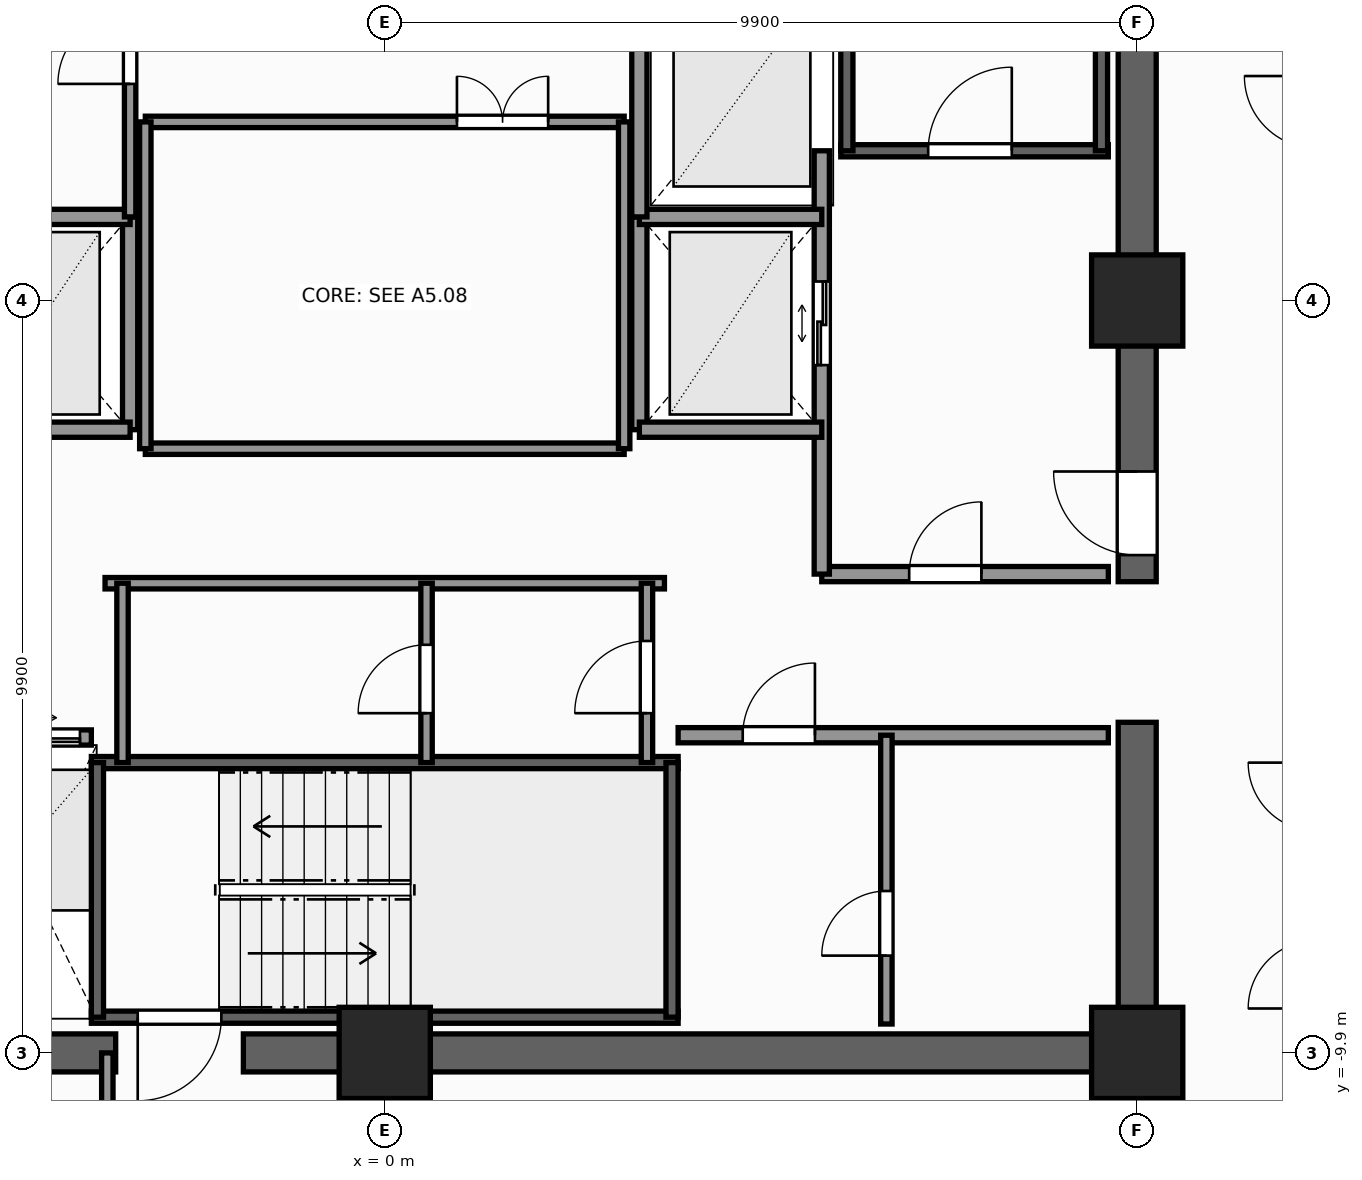
"""IFC4 building model, lengths in metres.
Left out: names, types, materials, properties, quantities, classifications, styles, units other than length and angle.
Written with IfcOpenShell. Run it as: python <this file> out.ifc"""

import sys

from ifc_helpers import new_model, si_unit, direction, frame, frame_2d, origin, origin_2d, place, context, subcontext, project, spatial, rectangle, extrude, element, fill, save


model = new_model("IFC4")
c1 = context("Model", 3, precision=1e-05, world=origin(), true_north=direction((0.0, 1.0)))
c2 = subcontext(c1, "Body", "Model", "MODEL_VIEW")
j1 = project(units=[si_unit("LENGTHUNIT", "METRE"), si_unit("PLANEANGLEUNIT", "RADIAN")], contexts=[c1])
p1 = place(None, origin())
s1 = spatial("IfcSite", under=j1, at=p1, CompositionType="ELEMENT")
p2 = place(p1, origin())
s2 = spatial("IfcBuilding", under=s1, at=p2, CompositionType="ELEMENT")
p3 = place(p2, frame((0.0, 0.0, 108.5)))
s3 = spatial("IfcBuildingStorey", under=s2, at=p3, CompositionType="ELEMENT", Elevation=108.5)
p4 = place(p3, frame((10.15, -9.9, 0.0), z_axis=(0.0, 0.0, 1.0), x_axis=(-1.0, 0.0, 0.0)))
e1 = element("IfcWall", 1, at=p4, inside=s3, PredefinedType="SHEAR", context=c2, shape_type="SweptSolid", body=[
    extrude(rectangle(XDim=12.01, YDim=0.5, at=frame_2d((6.005, 0.0))), origin(), (0.0, 0.0, 1.0), 3.3),
])
p5 = place(p3, frame((-3.54, -9.9, 0.0), z_axis=(0.0, 0.0, 1.0), x_axis=(-1.0, 0.0, 0.0)))
e2 = element("IfcWall", 2, at=p5, inside=s3, PredefinedType="SHEAR", context=c2, shape_type="SweptSolid", body=[
    extrude(rectangle(XDim=6.61, YDim=0.5, at=frame_2d((3.305, 0.0))), origin(), (0.0, 0.0, 1.0), 3.3),
])
p6 = place(p3, frame((9.9, -9.65, 0.0), z_axis=(0.0, 0.0, 1.0), x_axis=(0.0, 1.0, 0.0)))
e3 = element("IfcWall", 3, at=p6, inside=s3, PredefinedType="SHEAR", context=c2, shape_type="SweptSolid", body=[
    extrude(rectangle(XDim=4.1, YDim=0.5, at=frame_2d((2.05, 0.0))), origin(), (0.0, 0.0, 1.0), 3.3),
])
p7 = place(p3, frame((9.9, -3.7, 0.0), z_axis=(0.0, 0.0, 1.0), x_axis=(0.0, 1.0, 0.0)))
e4 = element("IfcWall", 4, at=p7, inside=s3, PredefinedType="SHEAR", context=c2, shape_type="SweptSolid", body=[
    extrude(rectangle(XDim=13.35, YDim=0.5, at=frame_2d((6.675, 0.0))), origin(), (0.0, 0.0, 1.0), 3.3),
])
p8 = place(p7, frame((0.35, 0.0, 0.0)))
e5 = element("IfcOpeningElement", 5, at=p8, cuts=e4, PredefinedType="OPENING", context=c2, shape_type="SweptSolid", body=[
    extrude(rectangle(XDim=1.1, YDim=2.2, at=frame_2d((0.55, 1.1))), frame((0.0, 0.26, 0.0), z_axis=(0.0, -1.0, 0.0), x_axis=(1.0, 0.0, 0.0)), (0.0, 0.0, 1.0), 0.52),
])
for number, where, z_axis, x_axis in (
    (6, (9.9, -9.9, 0.0), (0.0, 0.0, 1.0), (1.0, 0.0, 0.0)),
    (7, (0.0, -9.9, 0.0), (0.0, 0.0, 1.0), (1.0, 0.0, 0.0)),
    (8, (9.9, 0.0, 0.0), (0.0, 0.0, 1.0), (1.0, 0.0, 0.0)),
):
    element("IfcColumn", number, at=place(p3, frame(where, z_axis=z_axis, x_axis=x_axis)), inside=s3, PredefinedType="COLUMN", context=c2, shape_type="SweptSolid", body=[
        extrude(rectangle(XDim=1.2, YDim=1.2, at=origin_2d()), origin(), (0.0, 0.0, 1.0), 3.3),
    ])
p9 = place(p3, frame((6.0, 1.97, 0.0), z_axis=(0.0, 0.0, 1.0), x_axis=(1.0, 0.0, 0.0)))
e9 = element("IfcWall", 9, at=p9, inside=s3, PredefinedType="SHEAR", context=c2, shape_type="SweptSolid", body=[
    extrude(rectangle(XDim=3.52, YDim=0.16, at=frame_2d((1.76, 0.0))), origin(), (0.0, 0.0, 1.0), 3.3),
])
p10 = place(p9, frame((1.15, 0.0, 0.0)))
e10 = element("IfcOpeningElement", 10, at=p10, cuts=e9, PredefinedType="OPENING", context=c2, shape_type="SweptSolid", body=[
    extrude(rectangle(XDim=1.1, YDim=2.2, at=frame_2d((0.55, 1.1))), frame((0.0, 0.09, 0.0), z_axis=(0.0, -1.0, 0.0), x_axis=(1.0, 0.0, 0.0)), (0.0, 0.0, 1.0), 0.18),
])
for number, where, z_axis, x_axis in (
    (11, (6.08, 1.97, 0.0), (0.0, 0.0, 1.0), (0.0, 1.0, 0.0)),
    (12, (9.43, 1.97, 0.0), (0.0, 0.0, 1.0), (0.0, 1.0, 0.0)),
):
    element("IfcWall", number, at=place(p3, frame(where, z_axis=z_axis, x_axis=x_axis)), inside=s3, PredefinedType="SHEAR", context=c2, shape_type="SweptSolid", body=[
        extrude(rectangle(XDim=7.56, YDim=0.16, at=frame_2d((3.78, 0.0))), origin(), (0.0, 0.0, 1.0), 3.3),
    ])
p11 = place(p3, frame((3.86, -9.43, 0.0), z_axis=(0.0, 0.0, 1.0), x_axis=(-1.0, 0.0, 0.0)))
e13 = element("IfcWall", 13, at=p11, inside=s3, PredefinedType="SHEAR", context=c2, shape_type="SweptSolid", body=[
    extrude(rectangle(XDim=7.72, YDim=0.16, at=frame_2d((3.86, 0.0))), origin(), (0.0, 0.0, 1.0), 3.3),
])
p12 = place(p11, frame((6.01, 0.0, 0.0)))
e14 = element("IfcOpeningElement", 14, at=p12, cuts=e13, PredefinedType="OPENING", context=c2, shape_type="SweptSolid", body=[
    extrude(rectangle(XDim=1.1, YDim=2.2, at=frame_2d((0.55, 1.1))), frame((0.0, 0.09, 0.0), z_axis=(0.0, -1.0, 0.0), x_axis=(1.0, 0.0, 0.0)), (0.0, 0.0, 1.0), 0.18),
])
p13 = place(p3, frame((-3.86, -6.08, 0.0), z_axis=(0.0, 0.0, 1.0), x_axis=(1.0, 0.0, 0.0)))
e15 = element("IfcWall", 15, at=p13, inside=s3, PredefinedType="SHEAR", context=c2, shape_type="SweptSolid", body=[
    extrude(rectangle(XDim=7.72, YDim=0.16, at=frame_2d((3.86, 0.0))), origin(), (0.0, 0.0, 1.0), 3.3),
])
for number, where, z_axis, x_axis in (
    (16, (-3.78, -9.43, 0.0), (0.0, 0.0, 1.0), (0.0, 1.0, 0.0)),
    (17, (3.78, -9.43, 0.0), (0.0, 0.0, 1.0), (0.0, 1.0, 0.0)),
):
    element("IfcWall", number, at=place(p3, frame(where, z_axis=z_axis, x_axis=x_axis)), inside=s3, PredefinedType="SHEAR", context=c2, shape_type="SweptSolid", body=[
        extrude(rectangle(XDim=3.35, YDim=0.16, at=frame_2d((1.675, 0.0))), origin(), (0.0, 0.0, 1.0), 3.3),
    ])
p14 = place(p3, frame((-3.35, -1.7, 0.0), z_axis=(0.0, 0.0, 1.0), x_axis=(0.0, 1.0, 0.0)))
e18 = element("IfcWall", 18, at=p14, inside=s3, PredefinedType="SOLIDWALL", context=c2, shape_type="SweptSolid", body=[
    extrude(rectangle(XDim=2.8, YDim=0.2, at=frame_2d((1.4, 0.0))), origin(), (0.0, 0.0, 1.0), 2.715),
])
for number, where, z_axis, x_axis in (
    (19, (-5.75, -1.7, 0.0), (0.0, 0.0, 1.0), (1.0, 0.0, 0.0)),
    (20, (-5.75, 1.1, 0.0), (0.0, 0.0, 1.0), (1.0, 0.0, 0.0)),
):
    element("IfcWall", number, at=place(p3, frame(where, z_axis=z_axis, x_axis=x_axis)), inside=s3, PredefinedType="SOLIDWALL", context=c2, shape_type="SweptSolid", body=[
        extrude(rectangle(XDim=2.4, YDim=0.2, at=frame_2d((1.2, 0.0))), origin(), (0.0, 0.0, 1.0), 3.08),
    ])
p15 = place(p3, frame((5.75, -3.6, 0.0), z_axis=(0.0, 0.0, 1.0), x_axis=(1.0, 0.0, 0.0)))
e21 = element("IfcWall", 21, at=p15, inside=s3, PredefinedType="SOLIDWALL", context=c2, shape_type="SweptSolid", body=[
    extrude(rectangle(XDim=3.77, YDim=0.2, at=frame_2d((1.885, 0.0))), origin(), (0.0, 0.0, 1.0), 3.08),
])
p16 = place(p15, frame((1.15, 0.0, 0.0)))
e22 = element("IfcOpeningElement", 22, at=p16, cuts=e21, PredefinedType="OPENING", context=c2, shape_type="SweptSolid", body=[
    extrude(rectangle(XDim=0.95, YDim=2.06, at=frame_2d((0.475, 1.03))), frame((0.0, 0.11, 0.0), z_axis=(0.0, -1.0, 0.0), x_axis=(1.0, 0.0, 0.0)), (0.0, 0.0, 1.0), 0.22),
])
p17 = place(p3, frame((5.75, -3.6, 0.0), z_axis=(0.0, 0.0, 1.0), x_axis=(0.0, 1.0, 0.0)))
e23 = element("IfcWall", 23, at=p17, inside=s3, PredefinedType="SOLIDWALL", context=c2, shape_type="SweptSolid", body=[
    extrude(rectangle(XDim=5.57, YDim=0.2, at=frame_2d((2.785, 0.0))), origin(), (0.0, 0.0, 1.0), 2.715),
])
p18 = place(p17, frame((2.75, 0.0, 0.0)))
e24 = element("IfcOpeningElement", 24, at=p18, cuts=e23, PredefinedType="OPENING", context=c2, shape_type="SweptSolid", body=[
    extrude(rectangle(XDim=1.1, YDim=2.2, at=frame_2d((0.55, 1.1))), frame((0.0, 0.11, 0.0), z_axis=(0.0, -1.0, 0.0), x_axis=(1.0, 0.0, 0.0)), (0.0, 0.0, 1.0), 0.22),
])
p19 = place(p3, frame((3.35, -1.7, 0.0), z_axis=(0.0, 0.0, 1.0), x_axis=(0.0, 1.0, 0.0)))
e25 = element("IfcWall", 25, at=p19, inside=s3, PredefinedType="SOLIDWALL", context=c2, shape_type="SweptSolid", body=[
    extrude(rectangle(XDim=2.8, YDim=0.2, at=frame_2d((1.4, 0.0))), origin(), (0.0, 0.0, 1.0), 2.715),
])
for number, where, z_axis, x_axis in (
    (26, (3.35, -1.7, 0.0), (0.0, 0.0, 1.0), (1.0, 0.0, 0.0)),
    (27, (3.35, 1.1, 0.0), (0.0, 0.0, 1.0), (1.0, 0.0, 0.0)),
):
    element("IfcWall", number, at=place(p3, frame(where, z_axis=z_axis, x_axis=x_axis)), inside=s3, PredefinedType="SOLIDWALL", context=c2, shape_type="SweptSolid", body=[
        extrude(rectangle(XDim=2.4, YDim=0.2, at=frame_2d((1.2, 0.0))), origin(), (0.0, 0.0, 1.0), 3.08),
    ])
p20 = place(p3, frame((3.35, 1.1, 0.0), z_axis=(0.0, 0.0, 1.0), x_axis=(0.0, 1.0, 0.0)))
e28 = element("IfcWall", 28, at=p20, inside=s3, PredefinedType="SOLIDWALL", context=c2, shape_type="SweptSolid", body=[
    extrude(rectangle(XDim=3.2, YDim=0.2, at=frame_2d((1.6, 0.0))), origin(), (0.0, 0.0, 1.0), 2.715),
])
p21 = place(p3, frame((-9.52, -5.75, 0.0), z_axis=(0.0, 0.0, 1.0), x_axis=(1.0, 0.0, 0.0)))
e29 = element("IfcWall", 29, at=p21, inside=s3, PredefinedType="SOLIDWALL", context=c2, shape_type="SweptSolid", body=[
    extrude(rectangle(XDim=5.66, YDim=0.2, at=frame_2d((2.83, 0.0))), origin(), (0.0, 0.0, 1.0), 3.08),
])
p22 = place(p21, frame((0.55, 0.0, 0.0)))
e30 = element("IfcOpeningElement", 30, at=p22, cuts=e29, PredefinedType="OPENING", context=c2, shape_type="SweptSolid", body=[
    extrude(rectangle(XDim=1.1, YDim=2.2, at=frame_2d((0.55, 1.1))), frame((0.0, 0.11, 0.0), z_axis=(0.0, -1.0, 0.0), x_axis=(1.0, 0.0, 0.0)), (0.0, 0.0, 1.0), 0.22),
])
p23 = place(p21, frame((2.48, 0.0, 0.0)))
e31 = element("IfcOpeningElement", 31, at=p23, cuts=e29, PredefinedType="OPENING", context=c2, shape_type="SweptSolid", body=[
    extrude(rectangle(XDim=1.1, YDim=2.2, at=frame_2d((0.55, 1.1))), frame((0.0, 0.11, 0.0), z_axis=(0.0, -1.0, 0.0), x_axis=(1.0, 0.0, 0.0)), (0.0, 0.0, 1.0), 0.22),
])
p24 = place(p21, frame((4.41, 0.0, 0.0)))
e32 = element("IfcOpeningElement", 32, at=p24, cuts=e29, PredefinedType="OPENING", context=c2, shape_type="SweptSolid", body=[
    extrude(rectangle(XDim=1.1, YDim=2.2, at=frame_2d((0.55, 1.1))), frame((0.0, 0.11, 0.0), z_axis=(0.0, -1.0, 0.0), x_axis=(1.0, 0.0, 0.0)), (0.0, 0.0, 1.0), 0.22),
])
p25 = place(p3, frame((3.86, -5.72, 0.0), z_axis=(0.0, 0.0, 1.0), x_axis=(1.0, 0.0, 0.0)))
e33 = element("IfcWall", 33, at=p25, inside=s3, PredefinedType="SOLIDWALL", context=c2, shape_type="SweptSolid", body=[
    extrude(rectangle(XDim=5.66, YDim=0.2, at=frame_2d((2.83, 0.0))), origin(), (0.0, 0.0, 1.0), 3.08),
])
p26 = place(p25, frame((0.85, 0.0, 0.0)))
e34 = element("IfcOpeningElement", 34, at=p26, cuts=e33, PredefinedType="OPENING", context=c2, shape_type="SweptSolid", body=[
    extrude(rectangle(XDim=0.95, YDim=2.06, at=frame_2d((0.475, 1.03))), frame((0.0, 0.11, 0.0), z_axis=(0.0, -1.0, 0.0), x_axis=(1.0, 0.0, 0.0)), (0.0, 0.0, 1.0), 0.22),
])
p27 = place(p3, frame((6.6, -9.52, 0.0), z_axis=(0.0, 0.0, 1.0), x_axis=(0.0, 1.0, 0.0)))
e35 = element("IfcWall", 35, at=p27, inside=s3, PredefinedType="PARTITIONING", context=c2, shape_type="SweptSolid", body=[
    extrude(rectangle(XDim=3.8, YDim=0.15, at=frame_2d((1.9, 0.0))), origin(), (0.0, 0.0, 1.0), 3.08),
])
p28 = place(p27, frame((0.9, 0.0, 0.0)))
e36 = element("IfcOpeningElement", 36, at=p28, cuts=e35, PredefinedType="OPENING", context=c2, shape_type="SweptSolid", body=[
    extrude(rectangle(XDim=0.85, YDim=2.03, at=frame_2d((0.425, 1.015))), frame((0.0, 0.085, 0.0), z_axis=(0.0, -1.0, 0.0), x_axis=(1.0, 0.0, 0.0)), (0.0, 0.0, 1.0), 0.17),
])
p29 = place(p3, frame((-3.15, 2.35, 0.0), z_axis=(0.0, 0.0, 1.0), x_axis=(1.0, 0.0, 0.0)))
e37 = element("IfcWall", 37, at=p29, inside=s3, PredefinedType="PARTITIONING", context=c2, shape_type="SweptSolid", body=[
    extrude(rectangle(XDim=6.3, YDim=0.15, at=frame_2d((3.15, 0.0))), origin(), (0.0, 0.0, 1.0), 2.715),
])
p30 = place(p29, frame((4.1, 0.0, 0.0)))
e38 = element("IfcOpeningElement", 38, at=p30, cuts=e37, PredefinedType="OPENING", context=c2, shape_type="SweptSolid", body=[
    extrude(rectangle(XDim=1.2, YDim=2.2, at=frame_2d((0.6, 1.1))), frame((0.0, 0.085, 0.0), z_axis=(0.0, -1.0, 0.0), x_axis=(1.0, 0.0, 0.0)), (0.0, 0.0, 1.0), 0.17),
])
p31 = place(p3, frame((-3.15, -1.95, 0.0), z_axis=(0.0, 0.0, 1.0), x_axis=(1.0, 0.0, 0.0)))
e39 = element("IfcWall", 39, at=p31, inside=s3, PredefinedType="PARTITIONING", context=c2, shape_type="SweptSolid", body=[
    extrude(rectangle(XDim=6.3, YDim=0.15, at=frame_2d((3.15, 0.0))), origin(), (0.0, 0.0, 1.0), 2.715),
])
for number, where, z_axis, x_axis in (
    (40, (-3.15, -1.95, 0.0), (0.0, 0.0, 1.0), (0.0, 1.0, 0.0)),
    (41, (3.15, -1.95, 0.0), (0.0, 0.0, 1.0), (0.0, 1.0, 0.0)),
):
    element("IfcWall", number, at=place(p3, frame(where, z_axis=z_axis, x_axis=x_axis)), inside=s3, PredefinedType="PARTITIONING", context=c2, shape_type="SweptSolid", body=[
        extrude(rectangle(XDim=4.3, YDim=0.15, at=frame_2d((2.15, 0.0))), origin(), (0.0, 0.0, 1.0), 2.715),
    ])
p32 = place(p3, frame((-3.68, -3.72, 0.0), z_axis=(0.0, 0.0, 1.0), x_axis=(1.0, 0.0, 0.0)))
e42 = element("IfcWall", 42, at=p32, inside=s3, PredefinedType="PARTITIONING", context=c2, shape_type="SweptSolid", body=[
    extrude(rectangle(XDim=7.36, YDim=0.15, at=frame_2d((3.68, 0.0))), origin(), (0.0, 0.0, 1.0), 3.08),
])
p33 = place(p3, frame((3.45, -6.08, 0.0), z_axis=(0.0, 0.0, 1.0), x_axis=(0.0, 1.0, 0.0)))
e43 = element("IfcWall", 43, at=p33, inside=s3, PredefinedType="PARTITIONING", context=c2, shape_type="SweptSolid", body=[
    extrude(rectangle(XDim=2.36, YDim=0.15, at=frame_2d((1.18, 0.0))), origin(), (0.0, 0.0, 1.0), 3.08),
])
p34 = place(p33, frame((0.65, 0.0, 0.0)))
e44 = element("IfcOpeningElement", 44, at=p34, cuts=e43, PredefinedType="OPENING", context=c2, shape_type="SweptSolid", body=[
    extrude(rectangle(XDim=0.95, YDim=2.06, at=frame_2d((0.475, 1.03))), frame((0.0, 0.085, 0.0), z_axis=(0.0, -1.0, 0.0), x_axis=(1.0, 0.0, 0.0)), (0.0, 0.0, 1.0), 0.17),
])
p35 = place(p3, frame((-3.45, -6.08, 0.0), z_axis=(0.0, 0.0, 1.0), x_axis=(0.0, 1.0, 0.0)))
e45 = element("IfcWall", 45, at=p35, inside=s3, PredefinedType="PARTITIONING", context=c2, shape_type="SweptSolid", body=[
    extrude(rectangle(XDim=2.36, YDim=0.15, at=frame_2d((1.18, 0.0))), origin(), (0.0, 0.0, 1.0), 3.08),
])
p36 = place(p3, frame((0.55, -6.08, 0.0), z_axis=(0.0, 0.0, 1.0), x_axis=(0.0, 1.0, 0.0)))
e46 = element("IfcWall", 46, at=p36, inside=s3, PredefinedType="PARTITIONING", context=c2, shape_type="SweptSolid", body=[
    extrude(rectangle(XDim=2.36, YDim=0.15, at=frame_2d((1.18, 0.0))), origin(), (0.0, 0.0, 1.0), 3.08),
])
p37 = place(p36, frame((0.65, 0.0, 0.0)))
e47 = element("IfcOpeningElement", 47, at=p37, cuts=e46, PredefinedType="OPENING", context=c2, shape_type="SweptSolid", body=[
    extrude(rectangle(XDim=0.9, YDim=2.06, at=frame_2d((0.45, 1.03))), frame((0.0, 0.085, 0.0), z_axis=(0.0, -1.0, 0.0), x_axis=(1.0, 0.0, 0.0)), (0.0, 0.0, 1.0), 0.17),
])
p38 = place(p3, frame((-3.35, 1.1, 0.0), z_axis=(0.0, 0.0, 1.0), x_axis=(0.0, 1.0, 0.0)))
e48 = element("IfcWall", 48, at=p38, inside=s3, PredefinedType="PARTITIONING", context=c2, shape_type="SweptSolid", body=[
    extrude(rectangle(XDim=3.2, YDim=0.15, at=frame_2d((1.6, 0.0))), origin(), (0.0, 0.0, 1.0), 2.715),
])
p39 = place(p38, frame((1.75, 0.0, 0.0)))
e49 = element("IfcOpeningElement", 49, at=p39, cuts=e48, PredefinedType="OPENING", context=c2, shape_type="SweptSolid", body=[
    extrude(rectangle(XDim=0.95, YDim=2.06, at=frame_2d((0.475, 1.03))), frame((0.0, 0.085, 0.0), z_axis=(0.0, -1.0, 0.0), x_axis=(1.0, 0.0, 0.0)), (0.0, 0.0, 1.0), 0.17),
])
p40 = place(p3, frame((-3.65, -12.26, 0.0), z_axis=(0.0, 0.0, 1.0), x_axis=(0.0, 1.0, 0.0)))
e50 = element("IfcWall", 50, at=p40, inside=s3, PredefinedType="PARTITIONING", context=c2, shape_type="SweptSolid", body=[
    extrude(rectangle(XDim=2.36, YDim=0.15, at=frame_2d((1.18, 0.0))), origin(), (0.0, 0.0, 1.0), 3.08),
])
p41 = place(p10, origin())
e51 = element("IfcDoor", 51, at=p41, inside=s3, OperationType="SINGLE_SWING_RIGHT", PredefinedType="DOOR", context=c2, shape_type="SweptSolid", body=[
    extrude(rectangle(XDim=1.1, YDim=2.2, at=frame_2d((0.55, 1.1))), frame((0.0, 0.025, 0.0), z_axis=(0.0, -1.0, 0.0), x_axis=(1.0, 0.0, 0.0)), (0.0, 0.0, 1.0), 0.05),
])
fill(e10, e51)
p42 = place(p12, origin())
e52 = element("IfcDoor", 52, at=p42, inside=s3, OperationType="SINGLE_SWING_RIGHT", PredefinedType="DOOR", context=c2, shape_type="SweptSolid", body=[
    extrude(rectangle(XDim=1.1, YDim=2.2, at=frame_2d((0.55, 1.1))), frame((0.0, 0.025, 0.0), z_axis=(0.0, -1.0, 0.0), x_axis=(1.0, 0.0, 0.0)), (0.0, 0.0, 1.0), 0.05),
])
fill(e14, e52)
p43 = place(p8, origin())
e53 = element("IfcDoor", 53, at=p43, inside=s3, OperationType="SINGLE_SWING_RIGHT", PredefinedType="DOOR", context=c2, shape_type="SweptSolid", body=[
    extrude(rectangle(XDim=1.1, YDim=2.2, at=frame_2d((0.55, 1.1))), frame((0.0, 0.025, 0.0), z_axis=(0.0, -1.0, 0.0), x_axis=(1.0, 0.0, 0.0)), (0.0, 0.0, 1.0), 0.05),
])
fill(e5, e53)
p44 = place(p18, origin())
e54 = element("IfcDoor", 54, at=p44, inside=s3, OperationType="DOUBLE_DOOR_SLIDING", PredefinedType="DOOR", context=c2, shape_type="SweptSolid", body=[
    extrude(rectangle(XDim=1.1, YDim=2.2, at=frame_2d((0.55, 1.1))), frame((0.0, 0.025, 0.0), z_axis=(0.0, -1.0, 0.0), x_axis=(1.0, 0.0, 0.0)), (0.0, 0.0, 1.0), 0.05),
])
fill(e24, e54)
p45 = place(p24, origin())
e55 = element("IfcDoor", 55, at=p45, inside=s3, OperationType="DOUBLE_DOOR_SLIDING", PredefinedType="DOOR", context=c2, shape_type="SweptSolid", body=[
    extrude(rectangle(XDim=1.1, YDim=2.2, at=frame_2d((0.55, 1.1))), frame((0.0, 0.025, 0.0), z_axis=(0.0, -1.0, 0.0), x_axis=(1.0, 0.0, 0.0)), (0.0, 0.0, 1.0), 0.05),
])
fill(e32, e55)
p46 = place(p26, origin())
e56 = element("IfcDoor", 56, at=p46, inside=s3, OperationType="SINGLE_SWING_RIGHT", PredefinedType="DOOR", context=c2, shape_type="SweptSolid", body=[
    extrude(rectangle(XDim=0.95, YDim=2.06, at=frame_2d((0.475, 1.03))), frame((0.0, 0.025, 0.0), z_axis=(0.0, -1.0, 0.0), x_axis=(1.0, 0.0, 0.0)), (0.0, 0.0, 1.0), 0.05),
])
fill(e34, e56)
p47 = place(p28, origin())
e57 = element("IfcDoor", 57, at=p47, inside=s3, OperationType="SINGLE_SWING_LEFT", PredefinedType="DOOR", context=c2, shape_type="SweptSolid", body=[
    extrude(rectangle(XDim=0.85, YDim=2.03, at=frame_2d((0.425, 1.015))), frame((0.0, 0.025, 0.0), z_axis=(0.0, -1.0, 0.0), x_axis=(1.0, 0.0, 0.0)), (0.0, 0.0, 1.0), 0.05),
])
fill(e36, e57)
p48 = place(p16, origin())
e58 = element("IfcDoor", 58, at=p48, inside=s3, OperationType="SINGLE_SWING_RIGHT", PredefinedType="DOOR", context=c2, shape_type="SweptSolid", body=[
    extrude(rectangle(XDim=0.95, YDim=2.06, at=frame_2d((0.475, 1.03))), frame((0.0, 0.025, 0.0), z_axis=(0.0, -1.0, 0.0), x_axis=(1.0, 0.0, 0.0)), (0.0, 0.0, 1.0), 0.05),
])
fill(e22, e58)
p49 = place(p30, origin())
e59 = element("IfcDoor", 59, at=p49, inside=s3, OperationType="DOUBLE_DOOR_SINGLE_SWING", PredefinedType="DOOR", context=c2, shape_type="SweptSolid", body=[
    extrude(rectangle(XDim=1.2, YDim=2.2, at=frame_2d((0.6, 1.1))), frame((0.0, 0.025, 0.0), z_axis=(0.0, -1.0, 0.0), x_axis=(1.0, 0.0, 0.0)), (0.0, 0.0, 1.0), 0.05),
])
fill(e38, e59)
p50 = place(p34, origin())
e60 = element("IfcDoor", 60, at=p50, inside=s3, OperationType="SINGLE_SWING_LEFT", PredefinedType="DOOR", context=c2, shape_type="SweptSolid", body=[
    extrude(rectangle(XDim=0.95, YDim=2.06, at=frame_2d((0.475, 1.03))), frame((0.0, 0.025, 0.0), z_axis=(0.0, -1.0, 0.0), x_axis=(1.0, 0.0, 0.0)), (0.0, 0.0, 1.0), 0.05),
])
fill(e44, e60)
p51 = place(p37, origin())
e61 = element("IfcDoor", 61, at=p51, inside=s3, OperationType="SINGLE_SWING_LEFT", PredefinedType="DOOR", context=c2, shape_type="SweptSolid", body=[
    extrude(rectangle(XDim=0.9, YDim=2.06, at=frame_2d((0.45, 1.03))), frame((0.0, 0.025, 0.0), z_axis=(0.0, -1.0, 0.0), x_axis=(1.0, 0.0, 0.0)), (0.0, 0.0, 1.0), 0.05),
])
fill(e47, e61)
p52 = place(p39, origin())
e62 = element("IfcDoor", 62, at=p52, inside=s3, OperationType="SINGLE_SWING_LEFT", PredefinedType="DOOR", context=c2, shape_type="SweptSolid", body=[
    extrude(rectangle(XDim=0.95, YDim=2.06, at=frame_2d((0.475, 1.03))), frame((0.0, 0.025, 0.0), z_axis=(0.0, -1.0, 0.0), x_axis=(1.0, 0.0, 0.0)), (0.0, 0.0, 1.0), 0.05),
])
fill(e49, e62)
save(model, sys.argv[1])
